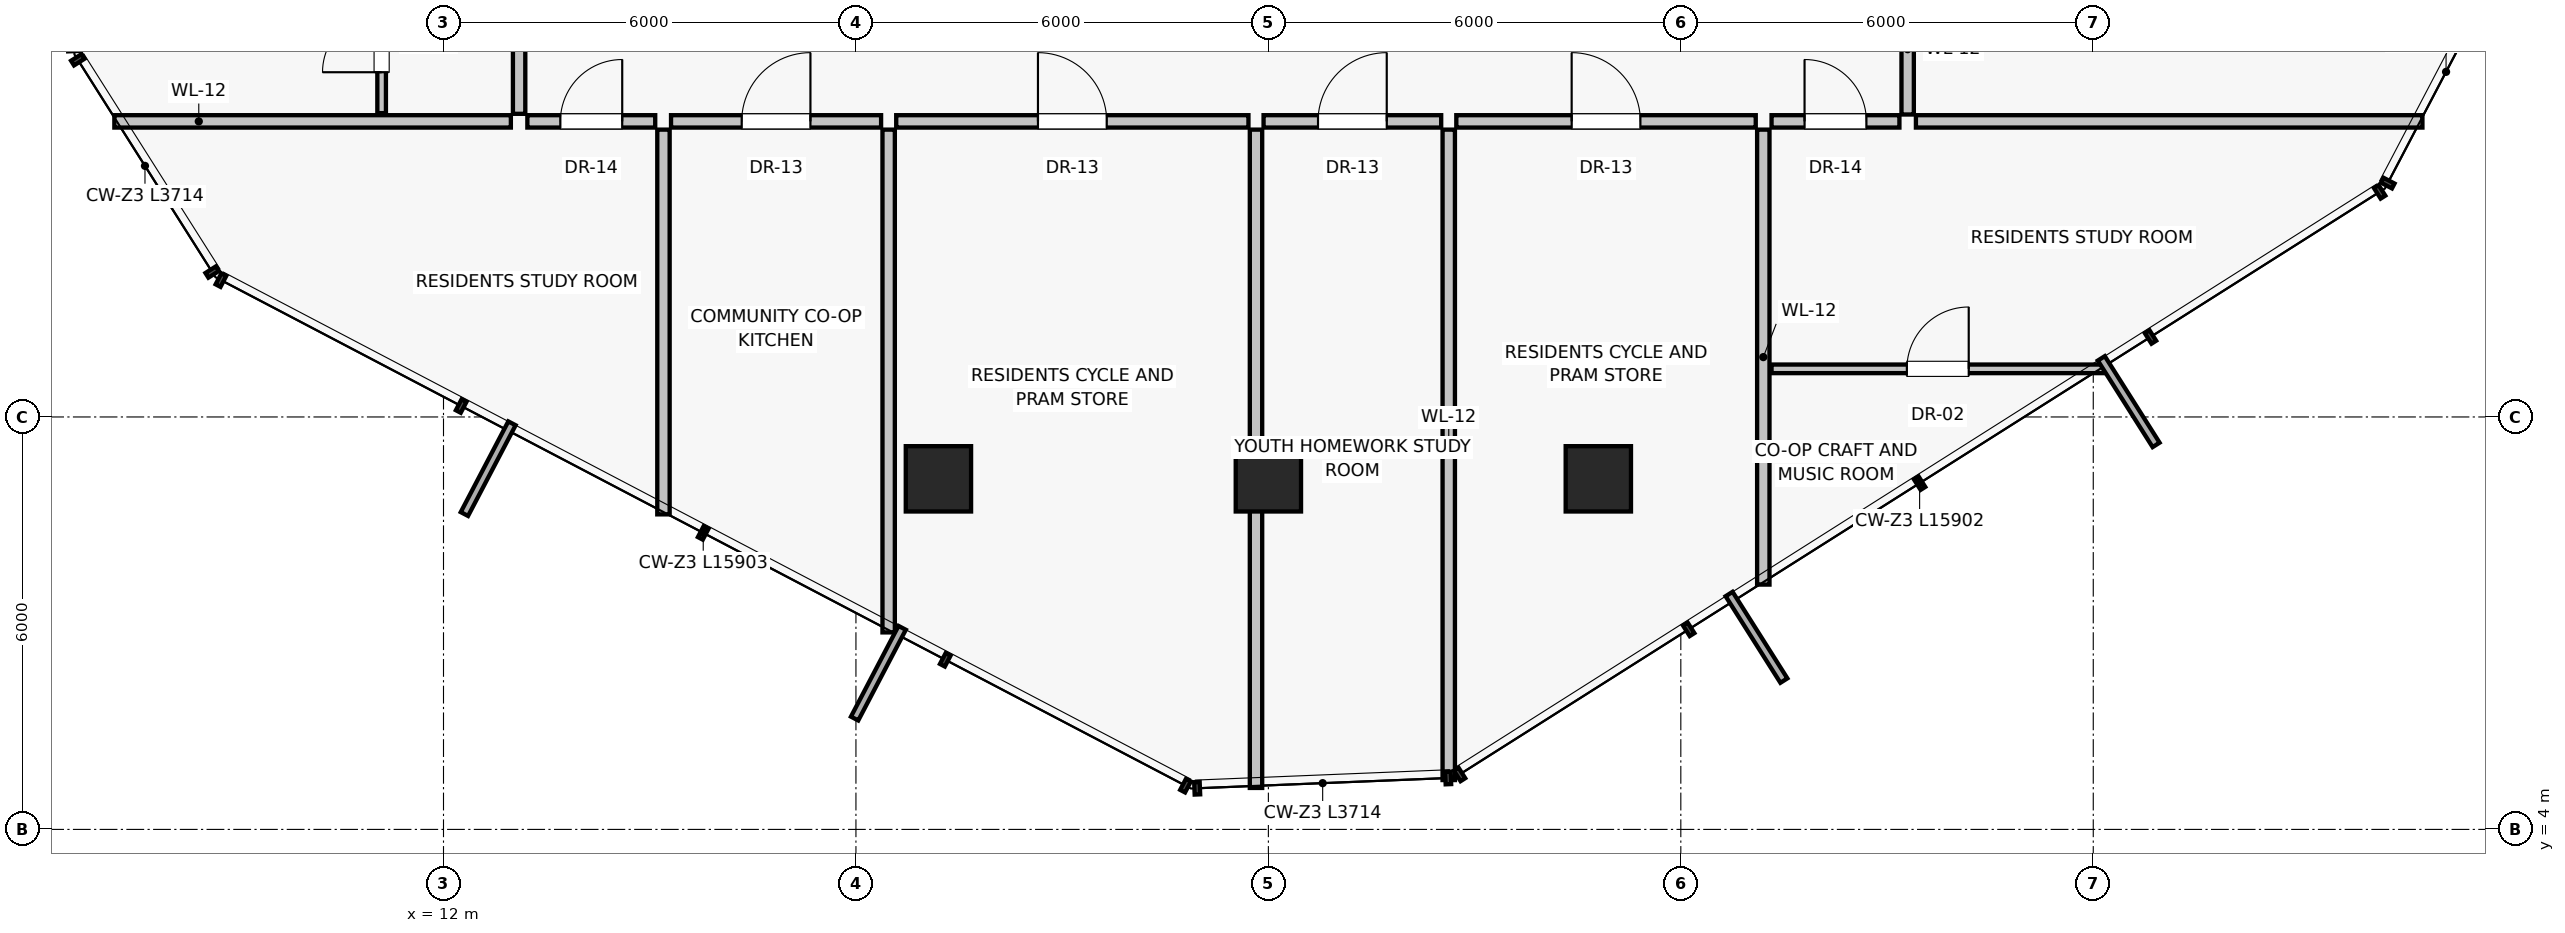
"""IFC4 building model, lengths in metres.
Left out: names, types, materials, properties, quantities, classifications, styles, units other than length and angle.
Written with IfcOpenShell. Run it as: python <this file> out.ifc"""

import sys

from ifc_helpers import new_model, si_unit, direction, frame, frame_2d, origin, origin_2d, place, context, subcontext, project, spatial, rectangle, extrude, source, transform, mapped, element, fill, save


model = new_model("IFC4")
c1 = context("Model", 3, precision=1e-05, world=origin(), true_north=direction((0.0, 1.0)))
c2 = subcontext(c1, "Body", "Model", "MODEL_VIEW")
j1 = project(units=[si_unit("LENGTHUNIT", "METRE"), si_unit("PLANEANGLEUNIT", "RADIAN")], contexts=[c1])
p1 = place(None, origin())
s1 = spatial("IfcSite", under=j1, at=p1, CompositionType="ELEMENT")
p2 = place(p1, origin())
s2 = spatial("IfcBuilding", under=s1, at=p2, CompositionType="ELEMENT")
p3 = place(p2, frame((0.0, 0.0, 198.35)))
s3 = spatial("IfcBuildingStorey", under=s2, at=p3, CompositionType="ELEMENT", Elevation=198.35)
for number, where, z_axis, x_axis in (
    (1, (19.2, 9.1, 0.0), (0.0, 0.0, 1.0), (1.0, 0.0, 0.0)),
    (2, (24.0, 9.1, 0.0), (0.0, 0.0, 1.0), (1.0, 0.0, 0.0)),
    (3, (28.8, 9.1, 0.0), (0.0, 0.0, 1.0), (1.0, 0.0, 0.0)),
):
    element("IfcColumn", number, at=place(p3, frame(where, z_axis=z_axis, x_axis=x_axis)), inside=s3, PredefinedType="COLUMN", context=c2, shape_type="SweptSolid", body=[
        extrude(rectangle(XDim=0.95, YDim=0.95, at=origin_2d()), origin(), (0.0, 0.0, 1.0), 3.25),
    ])
p4 = place(p3, frame((15.2, 14.18, 0.0), z_axis=(0.0, 0.0, 1.0), x_axis=(0.0, -1.0, 0.0)))
e4 = element("IfcWall", 4, at=p4, inside=s3, PredefinedType="PARTITIONING", context=c2, shape_type="SweptSolid", body=[
    extrude(rectangle(XDim=5.597, YDim=0.18, at=frame_2d((2.798, 0.0))), origin(), (0.0, 0.0, 1.0), 3.015),
])
p5 = place(p3, frame((31.2, 14.18, 0.0), z_axis=(0.0, 0.0, 1.0), x_axis=(0.0, -1.0, 0.0)))
e5 = element("IfcWall", 5, at=p5, inside=s3, PredefinedType="PARTITIONING", context=c2, shape_type="SweptSolid", body=[
    extrude(rectangle(XDim=6.618, YDim=0.18, at=frame_2d((3.309, 0.0))), origin(), (0.0, 0.0, 1.0), 3.015),
])
p6 = place(p3, frame((15.31, 14.3, 0.0), z_axis=(0.0, 0.0, 1.0), x_axis=(1.0, 0.0, 0.0)))
e6 = element("IfcWall", 6, at=p6, inside=s3, PredefinedType="PARTITIONING", context=c2, shape_type="SweptSolid", body=[
    extrude(rectangle(XDim=3.056, YDim=0.18, at=frame_2d((1.528, 0.0))), origin(), (0.0, 0.0, 1.0), 3.015),
])
p7 = place(p6, frame((1.028, 0.0, 0.0)))
e7 = element("IfcOpeningElement", 7, at=p7, cuts=e6, PredefinedType="OPENING", context=c2, shape_type="SweptSolid", body=[
    extrude(rectangle(XDim=1.0, YDim=2.01, at=frame_2d((0.5, 1.005))), frame((0.0, 0.1, 0.0), z_axis=(0.0, -1.0, 0.0), x_axis=(1.0, 0.0, 0.0)), (0.0, 0.0, 1.0), 0.2),
])
p8 = place(p3, frame((18.586, 14.3, 0.0), z_axis=(0.0, 0.0, 1.0), x_axis=(1.0, 0.0, 0.0)))
e8 = element("IfcWall", 8, at=p8, inside=s3, PredefinedType="PARTITIONING", context=c2, shape_type="SweptSolid", body=[
    extrude(rectangle(XDim=5.124, YDim=0.18, at=frame_2d((2.562, 0.0))), origin(), (0.0, 0.0, 1.0), 3.015),
])
p9 = place(p8, frame((2.062, 0.0, 0.0)))
e9 = element("IfcOpeningElement", 9, at=p9, cuts=e8, PredefinedType="OPENING", context=c2, shape_type="SweptSolid", body=[
    extrude(rectangle(XDim=1.0, YDim=2.01, at=frame_2d((0.5, 1.005))), frame((0.0, 0.1, 0.0), z_axis=(0.0, -1.0, 0.0), x_axis=(1.0, 0.0, 0.0)), (0.0, 0.0, 1.0), 0.2),
])
p10 = place(p3, frame((18.476, 14.18, 0.0), z_axis=(0.0, 0.0, 1.0), x_axis=(0.0, -1.0, 0.0)))
e10 = element("IfcWall", 10, at=p10, inside=s3, PredefinedType="PARTITIONING", context=c2, shape_type="SweptSolid", body=[
    extrude(rectangle(XDim=7.314, YDim=0.18, at=frame_2d((3.657, 0.0))), origin(), (0.0, 0.0, 1.0), 3.015),
])
p11 = place(p3, frame((23.82, 14.18, 0.0), z_axis=(0.0, 0.0, 1.0), x_axis=(0.0, -1.0, 0.0)))
e11 = element("IfcWall", 11, at=p11, inside=s3, PredefinedType="PARTITIONING", context=c2, shape_type="SweptSolid", body=[
    extrude(rectangle(XDim=9.577, YDim=0.18, at=frame_2d((4.788, 0.0))), origin(), (0.0, 0.0, 1.0), 3.015),
])
p12 = place(p3, frame((23.93, 14.3, 0.0), z_axis=(0.0, 0.0, 1.0), x_axis=(1.0, 0.0, 0.0)))
e12 = element("IfcWall", 12, at=p12, inside=s3, PredefinedType="PARTITIONING", context=c2, shape_type="SweptSolid", body=[
    extrude(rectangle(XDim=2.584, YDim=0.18, at=frame_2d((1.292, 0.0))), origin(), (0.0, 0.0, 1.0), 3.015),
])
p13 = place(p12, frame((0.792, 0.0, 0.0)))
e13 = element("IfcOpeningElement", 13, at=p13, cuts=e12, PredefinedType="OPENING", context=c2, shape_type="SweptSolid", body=[
    extrude(rectangle(XDim=1.0, YDim=2.01, at=frame_2d((0.5, 1.005))), frame((0.0, 0.1, 0.0), z_axis=(0.0, -1.0, 0.0), x_axis=(1.0, 0.0, 0.0)), (0.0, 0.0, 1.0), 0.2),
])
p14 = place(p3, frame((26.734, 14.3, 0.0), z_axis=(0.0, 0.0, 1.0), x_axis=(1.0, 0.0, 0.0)))
e14 = element("IfcWall", 14, at=p14, inside=s3, PredefinedType="PARTITIONING", context=c2, shape_type="SweptSolid", body=[
    extrude(rectangle(XDim=4.356, YDim=0.18, at=frame_2d((2.178, 0.0))), origin(), (0.0, 0.0, 1.0), 3.015),
])
p15 = place(p14, frame((1.678, 0.0, 0.0)))
e15 = element("IfcOpeningElement", 15, at=p15, cuts=e14, PredefinedType="OPENING", context=c2, shape_type="SweptSolid", body=[
    extrude(rectangle(XDim=1.0, YDim=2.01, at=frame_2d((0.5, 1.005))), frame((0.0, 0.1, 0.0), z_axis=(0.0, -1.0, 0.0), x_axis=(1.0, 0.0, 0.0)), (0.0, 0.0, 1.0), 0.2),
])
p16 = place(p3, frame((26.624, 14.18, 0.0), z_axis=(0.0, 0.0, 1.0), x_axis=(0.0, -1.0, 0.0)))
e16 = element("IfcWall", 16, at=p16, inside=s3, PredefinedType="PARTITIONING", context=c2, shape_type="SweptSolid", body=[
    extrude(rectangle(XDim=9.462, YDim=0.18, at=frame_2d((4.731, 0.0))), origin(), (0.0, 0.0, 1.0), 3.015),
])
p17 = place(p3, frame((12.98, 14.3, 0.0), z_axis=(0.0, 0.0, 1.0), x_axis=(-1.0, 0.0, 0.0)))
e17 = element("IfcWall", 17, at=p17, inside=s3, PredefinedType="PARTITIONING", context=c2, shape_type="SweptSolid", body=[
    extrude(rectangle(XDim=5.768, YDim=0.18, at=frame_2d((2.884, 0.0))), origin(), (0.0, 0.0, 1.0), 3.015),
])
p18 = place(p3, frame((13.1, 14.41, 0.0), z_axis=(0.0, 0.0, 1.0), x_axis=(0.0, 1.0, 0.0)))
e18 = element("IfcWall", 18, at=p18, inside=s3, PredefinedType="PARTITIONING", context=c2, shape_type="SweptSolid", body=[
    extrude(rectangle(XDim=11.484, YDim=0.18, at=frame_2d((5.742, 0.0))), origin(), (0.0, 0.0, 1.0), 2.662),
])
p19 = place(p18, frame((3.759, 0.0, 0.0)))
e19 = element("IfcOpeningElement", 19, at=p19, cuts=e18, PredefinedType="OPENING", context=c2, shape_type="SweptSolid", body=[
    extrude(rectangle(XDim=0.95, YDim=2.02, at=frame_2d((0.475, 1.01))), frame((0.0, 0.1, 0.0), z_axis=(0.0, -1.0, 0.0), x_axis=(1.0, 0.0, 0.0)), (0.0, 0.0, 1.0), 0.2),
])
p20 = place(p3, frame((11.1, 14.42, 0.0), z_axis=(0.0, 0.0, 1.0), x_axis=(0.0, 1.0, 0.0)))
e20 = element("IfcWall", 20, at=p20, inside=s3, PredefinedType="PARTITIONING", context=c2, shape_type="SweptSolid", body=[
    extrude(rectangle(XDim=2.05, YDim=0.125, at=frame_2d((1.025, 0.0))), origin(), (0.0, 0.0, 1.0), 3.015),
])
p21 = place(p20, frame((0.595, 0.0, 0.0)))
e21 = element("IfcOpeningElement", 21, at=p21, cuts=e20, PredefinedType="OPENING", context=c2, shape_type="SweptSolid", body=[
    extrude(rectangle(XDim=0.86, YDim=2.01, at=frame_2d((0.43, 1.005))), frame((0.0, 0.073, 0.0), z_axis=(0.0, -1.0, 0.0), x_axis=(1.0, 0.0, 0.0)), (0.0, 0.0, 1.0), 0.145),
])
p22 = place(p3, frame((33.3, 14.4, 0.0), z_axis=(0.0, 0.0, 1.0), x_axis=(0.0, 1.0, 0.0)))
e22 = element("IfcWall", 22, at=p22, inside=s3, PredefinedType="PARTITIONING", context=c2, shape_type="SweptSolid", body=[
    extrude(rectangle(XDim=1.9, YDim=0.18, at=frame_2d((0.95, 0.0))), origin(), (0.0, 0.0, 1.0), 3.015),
])
p23 = place(p3, frame((13.22, 14.3, 0.0), z_axis=(0.0, 0.0, 1.0), x_axis=(1.0, 0.0, 0.0)))
e23 = element("IfcWall", 23, at=p23, inside=s3, PredefinedType="PARTITIONING", context=c2, shape_type="SweptSolid", body=[
    extrude(rectangle(XDim=1.86, YDim=0.18, at=frame_2d((0.93, 0.0))), origin(), (0.0, 0.0, 1.0), 3.015),
])
p24 = place(p23, frame((0.48, 0.0, 0.0)))
e24 = element("IfcOpeningElement", 24, at=p24, cuts=e23, PredefinedType="OPENING", context=c2, shape_type="SweptSolid", body=[
    extrude(rectangle(XDim=0.9, YDim=2.01, at=frame_2d((0.45, 1.005))), frame((0.0, 0.1, 0.0), z_axis=(0.0, -1.0, 0.0), x_axis=(1.0, 0.0, 0.0)), (0.0, 0.0, 1.0), 0.2),
])
p25 = place(p3, frame((33.42, 14.3, 0.0), z_axis=(0.0, 0.0, 1.0), x_axis=(1.0, 0.0, 0.0)))
e25 = element("IfcWall", 25, at=p25, inside=s3, PredefinedType="PARTITIONING", context=c2, shape_type="SweptSolid", body=[
    extrude(rectangle(XDim=7.369, YDim=0.18, at=frame_2d((3.685, 0.0))), origin(), (0.0, 0.0, 1.0), 3.015),
])
p26 = place(p3, frame((31.32, 14.3, 0.0), z_axis=(0.0, 0.0, 1.0), x_axis=(1.0, 0.0, 0.0)))
e26 = element("IfcWall", 26, at=p26, inside=s3, PredefinedType="PARTITIONING", context=c2, shape_type="SweptSolid", body=[
    extrude(rectangle(XDim=1.86, YDim=0.18, at=frame_2d((0.93, 0.0))), origin(), (0.0, 0.0, 1.0), 3.015),
])
p27 = place(p26, frame((0.48, 0.0, 0.0)))
e27 = element("IfcOpeningElement", 27, at=p27, cuts=e26, PredefinedType="OPENING", context=c2, shape_type="SweptSolid", body=[
    extrude(rectangle(XDim=0.9, YDim=2.01, at=frame_2d((0.45, 1.005))), frame((0.0, 0.1, 0.0), z_axis=(0.0, -1.0, 0.0), x_axis=(1.0, 0.0, 0.0)), (0.0, 0.0, 1.0), 0.2),
])
p28 = place(p3, frame((31.32, 10.7, 0.0), z_axis=(0.0, 0.0, 1.0), x_axis=(1.0, 0.0, 0.0)))
e28 = element("IfcWall", 28, at=p28, inside=s3, PredefinedType="PARTITIONING", context=c2, shape_type="SweptSolid", body=[
    extrude(rectangle(XDim=4.837, YDim=0.125, at=frame_2d((2.418, 0.0))), origin(), (0.0, 0.0, 1.0), 3.015),
])
p29 = place(p28, frame((1.969, 0.0, 0.0)))
e29 = element("IfcOpeningElement", 29, at=p29, cuts=e28, PredefinedType="OPENING", context=c2, shape_type="SweptSolid", body=[
    extrude(rectangle(XDim=0.9, YDim=2.01, at=frame_2d((0.45, 1.005))), frame((0.0, 0.073, 0.0), z_axis=(0.0, -1.0, 0.0), x_axis=(1.0, 0.0, 0.0)), (0.0, 0.0, 1.0), 0.145),
])
m1 = source(origin(), c2, "Body", "SweptSolid", [
    extrude(rectangle(XDim=1.0, YDim=2.01, at=frame_2d((0.5, 1.005))), frame((0.0, 0.025, 0.0), z_axis=(0.0, -1.0, 0.0), x_axis=(1.0, 0.0, 0.0)), (0.0, 0.0, 1.0), 0.05),
])
p30 = place(p7, origin())
e30 = element("IfcDoor", 30, at=p30, inside=s3, OperationType="SINGLE_SWING_RIGHT", PredefinedType="DOOR", context=c2, shape_type="MappedRepresentation", body=[
    mapped(m1, transform((0.0, 0.0, 0.0), scale=1.0)),
])
fill(e7, e30)
p31 = place(p9, origin())
e31 = element("IfcDoor", 31, at=p31, inside=s3, OperationType="SINGLE_SWING_LEFT", PredefinedType="DOOR", context=c2, shape_type="MappedRepresentation", body=[
    mapped(m1, transform((0.0, 0.0, 0.0), scale=1.0)),
])
fill(e9, e31)
p32 = place(p13, origin())
e32 = element("IfcDoor", 32, at=p32, inside=s3, OperationType="SINGLE_SWING_RIGHT", PredefinedType="DOOR", context=c2, shape_type="MappedRepresentation", body=[
    mapped(m1, transform((0.0, 0.0, 0.0), scale=1.0)),
])
fill(e13, e32)
p33 = place(p15, origin())
e33 = element("IfcDoor", 33, at=p33, inside=s3, OperationType="SINGLE_SWING_LEFT", PredefinedType="DOOR", context=c2, shape_type="MappedRepresentation", body=[
    mapped(m1, transform((0.0, 0.0, 0.0), scale=1.0)),
])
fill(e15, e33)
m2 = source(origin(), c2, "Body", "SweptSolid", [
    extrude(rectangle(XDim=0.86, YDim=2.01, at=frame_2d((0.43, 1.005))), frame((0.0, 0.025, 0.0), z_axis=(0.0, -1.0, 0.0), x_axis=(1.0, 0.0, 0.0)), (0.0, 0.0, 1.0), 0.05),
])
p34 = place(p21, origin())
e34 = element("IfcDoor", 34, at=p34, inside=s3, OperationType="SINGLE_SWING_LEFT", PredefinedType="DOOR", context=c2, shape_type="MappedRepresentation", body=[
    mapped(m2, transform((0.0, 0.0, 0.0), scale=1.0)),
])
fill(e21, e34)
m3 = source(origin(), c2, "Body", "SweptSolid", [
    extrude(rectangle(XDim=0.9, YDim=2.01, at=frame_2d((0.45, 1.005))), frame((0.0, 0.025, 0.0), z_axis=(0.0, -1.0, 0.0), x_axis=(1.0, 0.0, 0.0)), (0.0, 0.0, 1.0), 0.05),
])
p35 = place(p24, origin())
e35 = element("IfcDoor", 35, at=p35, inside=s3, OperationType="SINGLE_SWING_RIGHT", PredefinedType="DOOR", context=c2, shape_type="MappedRepresentation", body=[
    mapped(m3, transform((0.0, 0.0, 0.0), scale=1.0)),
])
fill(e24, e35)
p36 = place(p27, origin())
e36 = element("IfcDoor", 36, at=p36, inside=s3, OperationType="SINGLE_SWING_LEFT", PredefinedType="DOOR", context=c2, shape_type="MappedRepresentation", body=[
    mapped(m3, transform((0.0, 0.0, 0.0), scale=1.0)),
])
fill(e27, e36)
p37 = place(p29, origin())
e37 = element("IfcDoor", 37, at=p37, inside=s3, OperationType="SINGLE_SWING_RIGHT", PredefinedType="DOOR", context=c2, shape_type="MappedRepresentation", body=[
    mapped(m3, transform((0.0, 0.0, 0.0), scale=1.0)),
])
fill(e29, e37)
save(model, sys.argv[1])
